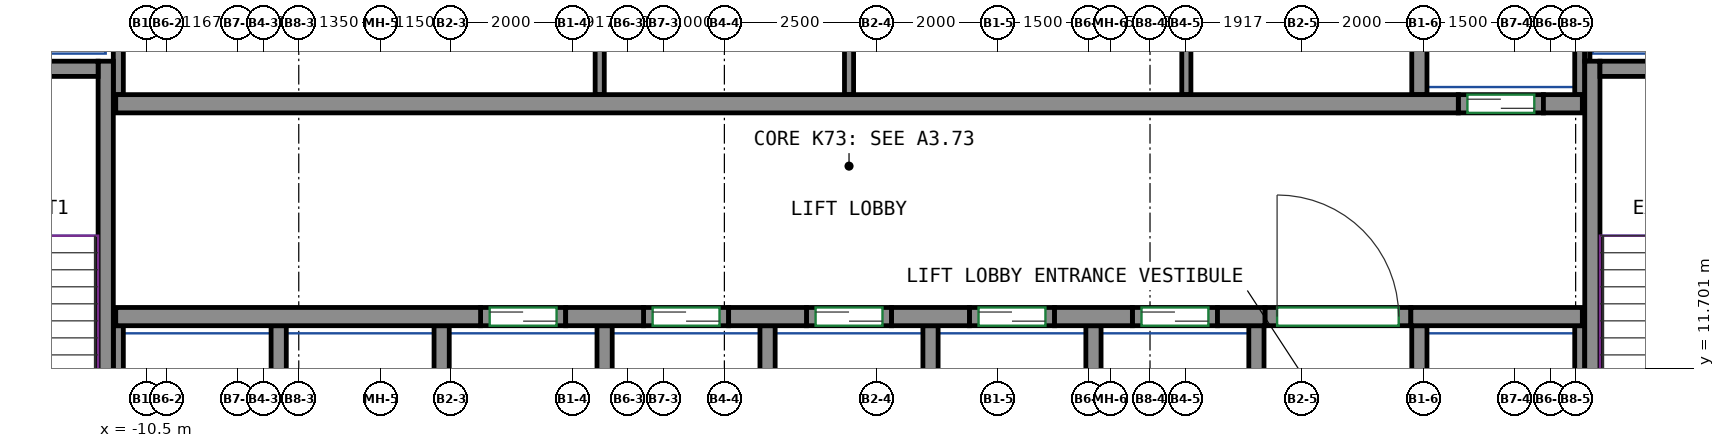
"""IFC4 building model, lengths in metres.
Left out: names, types, materials, properties, quantities, classifications, styles, units other than length and angle.
Written with IfcOpenShell. Run it as: python <this file> out.ifc"""

import sys

from ifc_helpers import new_model, si_unit, direction, frame, frame_2d, origin, place, context, subcontext, project, spatial, rectangle, extrude, source, transform, mapped, element, fill, save


model = new_model("IFC4")
c1 = context("Model", 3, precision=1e-05, world=origin(), true_north=direction((0.0, 1.0)))
c2 = subcontext(c1, "Body", "Model", "MODEL_VIEW")
j1 = project(units=[si_unit("LENGTHUNIT", "METRE"), si_unit("PLANEANGLEUNIT", "RADIAN")], contexts=[c1])
p1 = place(None, origin())
s1 = spatial("IfcSite", under=j1, at=p1, CompositionType="ELEMENT")
p2 = place(p1, origin())
s2 = spatial("IfcBuilding", under=s1, at=p2, CompositionType="ELEMENT")
p3 = place(p2, frame((0.0, 0.0, 290.8)))
s3 = spatial("IfcBuildingStorey", under=s2, at=p3, CompositionType="ELEMENT", Elevation=290.8)
m1 = source(origin(), c2, "Body", "SweptSolid", [
    extrude(rectangle(XDim=7.75, YDim=0.25, at=frame_2d((3.875, 0.0))), origin(), (0.0, 0.0, 1.0), 3.8),
])
p4 = place(p3, frame((-11.175, 9.0, 0.0), z_axis=(0.0, 0.0, 1.0), x_axis=(0.0, 1.0, 0.0)))
e1 = element("IfcWall", 1, at=p4, inside=s3, PredefinedType="SHEAR", context=c2, shape_type="MappedRepresentation", body=[
    mapped(m1, transform((0.0, 0.0, 0.0))),
])
m2 = source(origin(), c2, "Body", "SweptSolid", [
    extrude(rectangle(XDim=3.7, YDim=0.25, at=frame_2d((1.85, 0.0))), origin(), (0.0, 0.0, 1.0), 3.8),
])
p5 = place(p3, frame((-15.0, 16.625, 0.0), z_axis=(0.0, 0.0, 1.0), x_axis=(1.0, 0.0, 0.0)))
e2 = element("IfcWall", 2, at=p5, inside=s3, PredefinedType="SHEAR", context=c2, shape_type="MappedRepresentation", body=[
    mapped(m2, transform((0.0, 0.0, 0.0))),
])
p6 = place(p3, frame((13.275, 9.0, 0.0), z_axis=(0.0, 0.0, 1.0), x_axis=(0.0, 1.0, 0.0)))
e3 = element("IfcWall", 3, at=p6, inside=s3, PredefinedType="SHEAR", context=c2, shape_type="MappedRepresentation", body=[
    mapped(m1, transform((0.0, 0.0, 0.0))),
])
m3 = source(origin(), c2, "Body", "SweptSolid", [
    extrude(rectangle(XDim=3.7, YDim=0.25, at=frame_2d((1.85, 0.0))), origin(), (0.0, 0.0, 1.0), 3.8),
])
p7 = place(p3, frame((13.4, 16.625, 0.0), z_axis=(0.0, 0.0, 1.0), x_axis=(1.0, 0.0, 0.0)))
e4 = element("IfcWall", 4, at=p7, inside=s3, PredefinedType="SHEAR", context=c2, shape_type="MappedRepresentation", body=[
    mapped(m3, transform((0.0, 0.0, 0.0))),
])
m4 = source(origin(), c2, "Body", "SweptSolid", [
    extrude(rectangle(XDim=6.0, YDim=0.3, at=frame_2d((3.0, 0.0))), origin(), (0.0, 0.0, 1.0), 3.8),
])
p8 = place(p3, frame((-11.01, 12.55, 0.0), z_axis=(0.0, 0.0, 1.0), x_axis=(1.0, 0.0, 0.0)))
e5 = element("IfcWall", 5, at=p8, inside=s3, PredefinedType="SHEAR", context=c2, shape_type="MappedRepresentation", body=[
    mapped(m4, transform((0.0, 0.0, 0.0))),
])
m5 = source(origin(), c2, "Body", "SweptSolid", [
    extrude(rectangle(XDim=1.28, YDim=0.3, at=frame_2d((0.64, 0.0))), origin(), (0.0, 0.0, 1.0), 3.8),
])
for number, where, z_axis, x_axis in (
    (6, (-3.61, 12.55, 0.0), (0.0, 0.0, 1.0), (1.0, 0.0, 0.0)),
    (7, (-0.93, 12.55, 0.0), (0.0, 0.0, 1.0), (1.0, 0.0, 0.0)),
    (8, (1.75, 12.55, 0.0), (0.0, 0.0, 1.0), (1.0, 0.0, 0.0)),
    (9, (4.43, 12.55, 0.0), (0.0, 0.0, 1.0), (1.0, 0.0, 0.0)),
):
    element("IfcWall", number, at=place(p3, frame(where, z_axis=z_axis, x_axis=x_axis)), inside=s3, PredefinedType="SHEAR", context=c2, shape_type="MappedRepresentation", body=[
        mapped(m5, transform((0.0, 0.0, 0.0))),
    ])
m6 = source(origin(), c2, "Body", "SweptSolid", [
    extrude(rectangle(XDim=0.78, YDim=0.3, at=frame_2d((0.39, 0.0))), origin(), (0.0, 0.0, 1.0), 3.8),
])
p9 = place(p3, frame((7.11, 12.55, 0.0), z_axis=(0.0, 0.0, 1.0), x_axis=(1.0, 0.0, 0.0)))
e10 = element("IfcWall", 10, at=p9, inside=s3, PredefinedType="SHEAR", context=c2, shape_type="MappedRepresentation", body=[
    mapped(m6, transform((0.0, 0.0, 0.0))),
])
m7 = source(origin(), c2, "Body", "SweptSolid", [
    extrude(rectangle(XDim=2.82, YDim=0.3, at=frame_2d((1.41, 0.0))), origin(), (0.0, 0.0, 1.0), 3.8),
])
p10 = place(p3, frame((10.29, 12.55, 0.0), z_axis=(0.0, 0.0, 1.0), x_axis=(1.0, 0.0, 0.0)))
e11 = element("IfcWall", 11, at=p10, inside=s3, PredefinedType="SHEAR", context=c2, shape_type="MappedRepresentation", body=[
    mapped(m7, transform((0.0, 0.0, 0.0))),
])
m8 = source(origin(), c2, "Body", "SweptSolid", [
    extrude(rectangle(XDim=22.08, YDim=0.3, at=frame_2d((11.04, 0.0))), origin(), (0.0, 0.0, 1.0), 3.8),
])
p11 = place(p3, frame((-11.01, 16.05, 0.0), z_axis=(0.0, 0.0, 1.0), x_axis=(1.0, 0.0, 0.0)))
e12 = element("IfcWall", 12, at=p11, inside=s3, PredefinedType="SHEAR", context=c2, shape_type="MappedRepresentation", body=[
    mapped(m8, transform((0.0, 0.0, 0.0))),
])
m9 = source(origin(), c2, "Body", "SweptSolid", [
    extrude(rectangle(XDim=0.64, YDim=0.3, at=frame_2d((0.32, 0.0))), origin(), (0.0, 0.0, 1.0), 3.8),
])
p12 = place(p3, frame((12.47, 16.05, 0.0), z_axis=(0.0, 0.0, 1.0), x_axis=(1.0, 0.0, 0.0)))
e13 = element("IfcWall", 13, at=p12, inside=s3, PredefinedType="SHEAR", context=c2, shape_type="MappedRepresentation", body=[
    mapped(m9, transform((0.0, 0.0, 0.0))),
])
m10 = source(origin(), c2, "Body", "SweptSolid", [
    extrude(rectangle(XDim=1.4, YDim=0.3, at=frame_2d((0.7, 0.0))), origin(), (0.0, 0.0, 1.0), 3.8),
])
p13 = place(p3, frame((-5.01, 12.55, 0.0), z_axis=(0.0, 0.0, 1.0), x_axis=(1.0, 0.0, 0.0)))
e14 = element("IfcWall", 14, at=p13, inside=s3, PredefinedType="PARTITIONING", context=c2, shape_type="MappedRepresentation", body=[
    mapped(m10, transform((0.0, 0.0, 0.0))),
])
p14 = place(p13, frame((0.15, 0.0, 0.0)))
e15 = element("IfcOpeningElement", 15, at=p14, cuts=e14, PredefinedType="OPENING", context=c2, shape_type="SweptSolid", body=[
    extrude(rectangle(XDim=1.1, YDim=2.1, at=frame_2d((0.55, 1.05))), frame((0.0, 0.16, 0.0), z_axis=(0.0, -1.0, 0.0), x_axis=(1.0, 0.0, 0.0)), (0.0, 0.0, 1.0), 0.32),
])
m11 = source(origin(), c2, "Body", "SweptSolid", [
    extrude(rectangle(XDim=1.4, YDim=0.3, at=frame_2d((0.7, 0.0))), origin(), (0.0, 0.0, 1.0), 3.8),
])
p15 = place(p3, frame((-2.33, 12.55, 0.0), z_axis=(0.0, 0.0, 1.0), x_axis=(1.0, 0.0, 0.0)))
e16 = element("IfcWall", 16, at=p15, inside=s3, PredefinedType="PARTITIONING", context=c2, shape_type="MappedRepresentation", body=[
    mapped(m11, transform((0.0, 0.0, 0.0))),
])
p16 = place(p15, frame((0.15, 0.0, 0.0)))
e17 = element("IfcOpeningElement", 17, at=p16, cuts=e16, PredefinedType="OPENING", context=c2, shape_type="SweptSolid", body=[
    extrude(rectangle(XDim=1.1, YDim=2.1, at=frame_2d((0.55, 1.05))), frame((0.0, 0.16, 0.0), z_axis=(0.0, -1.0, 0.0), x_axis=(1.0, 0.0, 0.0)), (0.0, 0.0, 1.0), 0.32),
])
p17 = place(p3, frame((0.35, 12.55, 0.0), z_axis=(0.0, 0.0, 1.0), x_axis=(1.0, 0.0, 0.0)))
e18 = element("IfcWall", 18, at=p17, inside=s3, PredefinedType="PARTITIONING", context=c2, shape_type="MappedRepresentation", body=[
    mapped(m10, transform((0.0, 0.0, 0.0))),
])
p18 = place(p17, frame((0.15, 0.0, 0.0)))
e19 = element("IfcOpeningElement", 19, at=p18, cuts=e18, PredefinedType="OPENING", context=c2, shape_type="SweptSolid", body=[
    extrude(rectangle(XDim=1.1, YDim=2.1, at=frame_2d((0.55, 1.05))), frame((0.0, 0.16, 0.0), z_axis=(0.0, -1.0, 0.0), x_axis=(1.0, 0.0, 0.0)), (0.0, 0.0, 1.0), 0.32),
])
p19 = place(p3, frame((3.03, 12.55, 0.0), z_axis=(0.0, 0.0, 1.0), x_axis=(1.0, 0.0, 0.0)))
e20 = element("IfcWall", 20, at=p19, inside=s3, PredefinedType="PARTITIONING", context=c2, shape_type="MappedRepresentation", body=[
    mapped(m10, transform((0.0, 0.0, 0.0))),
])
p20 = place(p19, frame((0.15, 0.0, 0.0)))
e21 = element("IfcOpeningElement", 21, at=p20, cuts=e20, PredefinedType="OPENING", context=c2, shape_type="SweptSolid", body=[
    extrude(rectangle(XDim=1.1, YDim=2.1, at=frame_2d((0.55, 1.05))), frame((0.0, 0.16, 0.0), z_axis=(0.0, -1.0, 0.0), x_axis=(1.0, 0.0, 0.0)), (0.0, 0.0, 1.0), 0.32),
])
p21 = place(p3, frame((5.71, 12.55, 0.0), z_axis=(0.0, 0.0, 1.0), x_axis=(1.0, 0.0, 0.0)))
e22 = element("IfcWall", 22, at=p21, inside=s3, PredefinedType="PARTITIONING", context=c2, shape_type="MappedRepresentation", body=[
    mapped(m11, transform((0.0, 0.0, 0.0))),
])
p22 = place(p21, frame((0.15, 0.0, 0.0)))
e23 = element("IfcOpeningElement", 23, at=p22, cuts=e22, PredefinedType="OPENING", context=c2, shape_type="SweptSolid", body=[
    extrude(rectangle(XDim=1.1, YDim=2.1, at=frame_2d((0.55, 1.05))), frame((0.0, 0.16, 0.0), z_axis=(0.0, -1.0, 0.0), x_axis=(1.0, 0.0, 0.0)), (0.0, 0.0, 1.0), 0.32),
])
p23 = place(p3, frame((11.07, 16.05, 0.0), z_axis=(0.0, 0.0, 1.0), x_axis=(1.0, 0.0, 0.0)))
e24 = element("IfcWall", 24, at=p23, inside=s3, PredefinedType="PARTITIONING", context=c2, shape_type="MappedRepresentation", body=[
    mapped(m10, transform((0.0, 0.0, 0.0))),
])
p24 = place(p23, frame((0.15, 0.0, 0.0)))
e25 = element("IfcOpeningElement", 25, at=p24, cuts=e24, PredefinedType="OPENING", context=c2, shape_type="SweptSolid", body=[
    extrude(rectangle(XDim=1.1, YDim=2.1, at=frame_2d((0.55, 1.05))), frame((0.0, 0.16, 0.0), z_axis=(0.0, -1.0, 0.0), x_axis=(1.0, 0.0, 0.0)), (0.0, 0.0, 1.0), 0.32),
])
m12 = source(origin(), c2, "Body", "SweptSolid", [
    extrude(rectangle(XDim=2.4, YDim=0.3, at=frame_2d((1.2, 0.0))), origin(), (0.0, 0.0, 1.0), 3.8),
])
p25 = place(p3, frame((7.89, 12.55, 0.0), z_axis=(0.0, 0.0, 1.0), x_axis=(1.0, 0.0, 0.0)))
e26 = element("IfcWall", 26, at=p25, inside=s3, PredefinedType="PARTITIONING", context=c2, shape_type="MappedRepresentation", body=[
    mapped(m12, transform((0.0, 0.0, 0.0))),
])
p26 = place(p25, frame((0.2, 0.0, 0.0)))
e27 = element("IfcOpeningElement", 27, at=p26, cuts=e26, PredefinedType="OPENING", context=c2, shape_type="SweptSolid", body=[
    extrude(rectangle(XDim=2.0, YDim=2.1, at=frame_2d((1.0, 1.05))), frame((0.0, 0.16, 0.0), z_axis=(0.0, -1.0, 0.0), x_axis=(1.0, 0.0, 0.0)), (0.0, 0.0, 1.0), 0.32),
])
m13 = source(origin(), c2, "Body", "SweptSolid", [
    extrude(rectangle(XDim=3.275, YDim=0.165, at=frame_2d((1.638, 0.0))), origin(), (0.0, 0.0, 1.0), 3.8),
])
p27 = place(p3, frame((13.067, 16.2, 0.0), z_axis=(0.0, 0.0, 1.0), x_axis=(0.0, 1.0, 0.0)))
e28 = element("IfcWall", 28, at=p27, inside=s3, PredefinedType="PARTITIONING", context=c2, shape_type="MappedRepresentation", body=[
    mapped(m13, transform((0.0, 0.0, 0.0))),
])
m14 = source(origin(), c2, "Body", "SweptSolid", [
    extrude(rectangle(XDim=4.8, YDim=0.165, at=frame_2d((2.4, 0.0))), origin(), (0.0, 0.0, 1.0), 3.8),
])
p28 = place(p3, frame((-10.968, 16.2, 0.0), z_axis=(0.0, 0.0, 1.0), x_axis=(0.0, 1.0, 0.0)))
e29 = element("IfcWall", 29, at=p28, inside=s3, PredefinedType="PARTITIONING", context=c2, shape_type="MappedRepresentation", body=[
    mapped(m14, transform((0.0, 0.0, 0.0))),
])
m15 = source(origin(), c2, "Body", "SweptSolid", [
    extrude(rectangle(XDim=3.275, YDim=0.25, at=frame_2d((1.638, 0.0))), origin(), (0.0, 0.0, 1.0), 3.8),
])
p29 = place(p3, frame((10.43, 16.2, 0.0), z_axis=(0.0, 0.0, 1.0), x_axis=(0.0, 1.0, 0.0)))
e30 = element("IfcWall", 30, at=p29, inside=s3, PredefinedType="PARTITIONING", context=c2, shape_type="MappedRepresentation", body=[
    mapped(m15, transform((0.0, 0.0, 0.0))),
])
m16 = source(origin(), c2, "Body", "SweptSolid", [
    extrude(rectangle(XDim=2.725, YDim=0.085, at=frame_2d((1.363, 0.0))), origin(), (0.0, 0.0, 1.0), 3.8),
])
p30 = place(p3, frame((13.192, 16.75, 0.0), z_axis=(0.0, 0.0, 1.0), x_axis=(0.0, 1.0, 0.0)))
e31 = element("IfcWall", 31, at=p30, inside=s3, PredefinedType="PARTITIONING", context=c2, shape_type="MappedRepresentation", body=[
    mapped(m16, transform((0.0, 0.0, 0.0))),
])
m17 = source(origin(), c2, "Body", "SweptSolid", [
    extrude(rectangle(XDim=3.4, YDim=0.25, at=frame_2d((1.7, 0.0))), origin(), (0.0, 0.0, 1.0), 3.8),
])
p31 = place(p3, frame((10.43, 9.0, 0.0), z_axis=(0.0, 0.0, 1.0), x_axis=(0.0, 1.0, 0.0)))
e32 = element("IfcWall", 32, at=p31, inside=s3, PredefinedType="PARTITIONING", context=c2, shape_type="MappedRepresentation", body=[
    mapped(m17, transform((0.0, 0.0, 0.0))),
])
m18 = source(origin(), c2, "Body", "SweptSolid", [
    extrude(rectangle(XDim=3.4, YDim=0.165, at=frame_2d((1.7, 0.0))), origin(), (0.0, 0.0, 1.0), 3.8),
])
p32 = place(p3, frame((13.067, 9.0, 0.0), z_axis=(0.0, 0.0, 1.0), x_axis=(0.0, 1.0, 0.0)))
e33 = element("IfcWall", 33, at=p32, inside=s3, PredefinedType="PARTITIONING", context=c2, shape_type="MappedRepresentation", body=[
    mapped(m18, transform((0.0, 0.0, 0.0))),
])
for number, where, z_axis, x_axis in (
    (34, (2.39, 9.0, 0.0), (0.0, 0.0, 1.0), (0.0, 1.0, 0.0)),
    (35, (5.07, 9.0, 0.0), (0.0, 0.0, 1.0), (0.0, 1.0, 0.0)),
    (36, (7.75, 9.0, 0.0), (0.0, 0.0, 1.0), (0.0, 1.0, 0.0)),
    (37, (-0.29, 9.0, 0.0), (0.0, 0.0, 1.0), (0.0, 1.0, 0.0)),
):
    element("IfcWall", number, at=place(p3, frame(where, z_axis=z_axis, x_axis=x_axis)), inside=s3, PredefinedType="PARTITIONING", context=c2, shape_type="MappedRepresentation", body=[
        mapped(m17, transform((0.0, 0.0, 0.0))),
    ])
p33 = place(p3, frame((-10.968, 9.0, 0.0), z_axis=(0.0, 0.0, 1.0), x_axis=(0.0, 1.0, 0.0)))
e38 = element("IfcWall", 38, at=p33, inside=s3, PredefinedType="PARTITIONING", context=c2, shape_type="MappedRepresentation", body=[
    mapped(m18, transform((0.0, 0.0, 0.0))),
])
for number, where, z_axis, x_axis in (
    (39, (-2.97, 9.0, 0.0), (0.0, 0.0, 1.0), (0.0, 1.0, 0.0)),
    (40, (-5.65, 9.0, 0.0), (0.0, 0.0, 1.0), (0.0, 1.0, 0.0)),
    (41, (-8.33, 9.0, 0.0), (0.0, 0.0, 1.0), (0.0, 1.0, 0.0)),
):
    element("IfcWall", number, at=place(p3, frame(where, z_axis=z_axis, x_axis=x_axis)), inside=s3, PredefinedType="PARTITIONING", context=c2, shape_type="MappedRepresentation", body=[
        mapped(m17, transform((0.0, 0.0, 0.0))),
    ])
m19 = source(origin(), c2, "Body", "SweptSolid", [
    extrude(rectangle(XDim=4.8, YDim=0.15, at=frame_2d((2.4, 0.0))), origin(), (0.0, 0.0, 1.0), 3.8),
])
for number, where, z_axis, x_axis in (
    (42, (-3.05, 16.2, 0.0), (0.0, 0.0, 1.0), (0.0, 1.0, 0.0)),
    (43, (1.05, 16.2, 0.0), (0.0, 0.0, 1.0), (0.0, 1.0, 0.0)),
    (44, (6.598, 16.2, 0.0), (0.0, 0.0, 1.0), (0.0, 1.0, 0.0)),
):
    element("IfcWall", number, at=place(p3, frame(where, z_axis=z_axis, x_axis=x_axis)), inside=s3, PredefinedType="PARTITIONING", context=c2, shape_type="MappedRepresentation", body=[
        mapped(m19, transform((0.0, 0.0, 0.0))),
    ])
p34 = place(p26, origin())
e45 = element("IfcDoor", 45, at=p34, inside=s3, OperationType="DOUBLE_DOOR_SINGLE_SWING", PredefinedType="DOOR", context=c2, shape_type="SweptSolid", body=[
    extrude(rectangle(XDim=2.0, YDim=2.1, at=frame_2d((1.0, 1.05))), frame((0.0, 0.025, 0.0), z_axis=(0.0, -1.0, 0.0), x_axis=(1.0, 0.0, 0.0)), (0.0, 0.0, 1.0), 0.05),
])
fill(e27, e45)
p35 = place(p14, origin())
e46 = element("IfcDoor", 46, at=p35, inside=s3, OperationType="DOUBLE_DOOR_SLIDING", PredefinedType="DOOR", context=c2, shape_type="SweptSolid", body=[
    extrude(rectangle(XDim=1.1, YDim=2.1, at=frame_2d((0.55, 1.05))), frame((0.0, 0.025, 0.0), z_axis=(0.0, -1.0, 0.0), x_axis=(1.0, 0.0, 0.0)), (0.0, 0.0, 1.0), 0.05),
])
fill(e15, e46)
p36 = place(p16, origin())
e47 = element("IfcDoor", 47, at=p36, inside=s3, OperationType="DOUBLE_DOOR_SLIDING", PredefinedType="DOOR", context=c2, shape_type="SweptSolid", body=[
    extrude(rectangle(XDim=1.1, YDim=2.1, at=frame_2d((0.55, 1.05))), frame((0.0, 0.025, 0.0), z_axis=(0.0, -1.0, 0.0), x_axis=(1.0, 0.0, 0.0)), (0.0, 0.0, 1.0), 0.05),
])
fill(e17, e47)
p37 = place(p18, origin())
e48 = element("IfcDoor", 48, at=p37, inside=s3, OperationType="DOUBLE_DOOR_SLIDING", PredefinedType="DOOR", context=c2, shape_type="SweptSolid", body=[
    extrude(rectangle(XDim=1.1, YDim=2.1, at=frame_2d((0.55, 1.05))), frame((0.0, 0.025, 0.0), z_axis=(0.0, -1.0, 0.0), x_axis=(1.0, 0.0, 0.0)), (0.0, 0.0, 1.0), 0.05),
])
fill(e19, e48)
p38 = place(p20, origin())
e49 = element("IfcDoor", 49, at=p38, inside=s3, OperationType="DOUBLE_DOOR_SLIDING", PredefinedType="DOOR", context=c2, shape_type="SweptSolid", body=[
    extrude(rectangle(XDim=1.1, YDim=2.1, at=frame_2d((0.55, 1.05))), frame((0.0, 0.025, 0.0), z_axis=(0.0, -1.0, 0.0), x_axis=(1.0, 0.0, 0.0)), (0.0, 0.0, 1.0), 0.05),
])
fill(e21, e49)
p39 = place(p22, origin())
e50 = element("IfcDoor", 50, at=p39, inside=s3, OperationType="DOUBLE_DOOR_SLIDING", PredefinedType="DOOR", context=c2, shape_type="SweptSolid", body=[
    extrude(rectangle(XDim=1.1, YDim=2.1, at=frame_2d((0.55, 1.05))), frame((0.0, 0.025, 0.0), z_axis=(0.0, -1.0, 0.0), x_axis=(1.0, 0.0, 0.0)), (0.0, 0.0, 1.0), 0.05),
])
fill(e23, e50)
p40 = place(p24, origin())
e51 = element("IfcDoor", 51, at=p40, inside=s3, OperationType="DOUBLE_DOOR_SLIDING", PredefinedType="DOOR", context=c2, shape_type="SweptSolid", body=[
    extrude(rectangle(XDim=1.1, YDim=2.1, at=frame_2d((0.55, 1.05))), frame((0.0, 0.025, 0.0), z_axis=(0.0, -1.0, 0.0), x_axis=(1.0, 0.0, 0.0)), (0.0, 0.0, 1.0), 0.05),
])
fill(e25, e51)
save(model, sys.argv[1])
